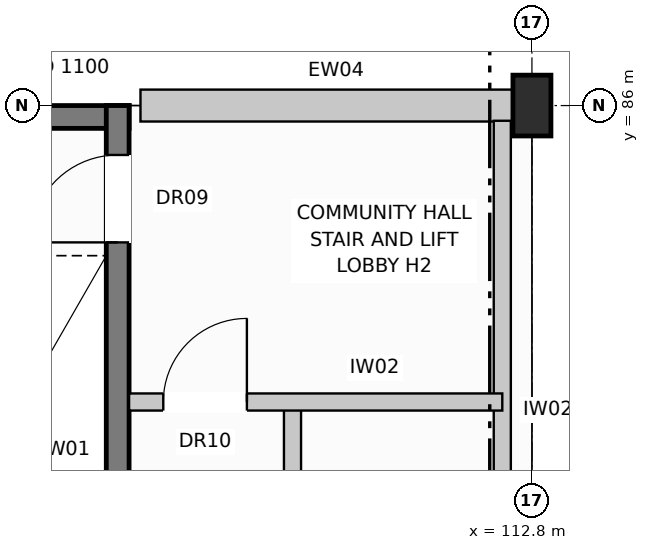
"""IFC4 building model, lengths in metres.
Left out: names, types, materials, properties, quantities, classifications, styles, units other than length and angle.
Written with IfcOpenShell. Run it as: python <this file> out.ifc"""

import sys

from ifc_helpers import new_model, si_unit, direction, frame, frame_2d, origin, origin_with_axes, origin_2d, place, context, subcontext, project, spatial, rectangle, extrude, element, fill, save


model = new_model("IFC4")
c1 = context("Model", 3, precision=1e-05, world=origin(), true_north=direction((0.0, 1.0)))
c2 = subcontext(c1, "Body", "Model", "MODEL_VIEW")
j1 = project(units=[si_unit("LENGTHUNIT", "METRE"), si_unit("PLANEANGLEUNIT", "RADIAN")], contexts=[c1])
p1 = place(None, origin())
s1 = spatial("IfcSite", under=j1, at=p1, CompositionType="ELEMENT")
p2 = place(p1, origin())
s2 = spatial("IfcBuilding", under=s1, at=p2, CompositionType="ELEMENT")
p3 = place(p2, frame((0.0, 0.0, 4.4)))
s3 = spatial("IfcBuildingStorey", under=s2, at=p3, CompositionType="ELEMENT", Elevation=4.4)
p4 = place(p3, frame((112.8, 86.0, 0.0), z_axis=(0.0, 0.0, 1.0), x_axis=(1.0, 0.0, 0.0)))
e1 = element("IfcColumn", 1, at=p4, inside=s3, PredefinedType="COLUMN", context=c2, shape_type="SweptSolid", body=[
    extrude(rectangle(XDim=0.5, YDim=0.8, at=origin_2d()), origin(), (0.0, 0.0, 1.0), 3.6),
])
p5 = place(p3, frame((107.65, 86.0, 0.0), z_axis=(0.0, 0.0, 1.0), x_axis=(1.0, 0.0, 0.0)))
e2 = element("IfcWall", 2, at=p5, inside=s3, PredefinedType="STANDARD", context=c2, shape_type="SweptSolid", body=[
    extrude(rectangle(XDim=5.15, YDim=0.42, at=frame_2d((2.575, 0.0))), origin(), (0.0, 0.0, 1.0), 2.545),
])
p6 = place(p3, frame((103.9, 85.85, 0.0), z_axis=(0.0, 0.0, 1.0), x_axis=(1.0, 0.0, 0.0)))
e3 = element("IfcWall", 3, at=p6, inside=s3, PredefinedType="SHEAR", context=c2, shape_type="SweptSolid", body=[
    extrude(rectangle(XDim=3.6, YDim=0.3, at=frame_2d((1.8, 0.0))), origin(), (0.0, 0.0, 1.0), 3.33),
])
p7 = place(p3, frame((107.35, 78.5, 0.0), z_axis=(0.0, 0.0, 1.0), x_axis=(0.0, 1.0, 0.0)))
e4 = element("IfcWall", 4, at=p7, inside=s3, PredefinedType="SHEAR", context=c2, shape_type="SweptSolid", body=[
    extrude(rectangle(XDim=7.5, YDim=0.3, at=frame_2d((3.75, 0.0))), origin(), (0.0, 0.0, 1.0), 3.33),
])
p8 = place(p7, frame((5.7, 0.0, 0.0)))
e5 = element("IfcOpeningElement", 5, at=p8, cuts=e4, PredefinedType="OPENING", context=c2, shape_type="SweptSolid", body=[
    extrude(rectangle(XDim=1.15, YDim=2.15, at=frame_2d((0.575, 1.075))), frame((0.0, 0.162, 0.0), z_axis=(0.0, -1.0, 0.0), x_axis=(1.0, 0.0, 0.0)), (0.0, 0.0, 1.0), 0.324),
])
p9 = place(p3, frame((112.41, 78.2, 0.0), z_axis=(0.0, 0.0, 1.0), x_axis=(0.0, 1.0, 0.0)))
e6 = element("IfcWall", 6, at=p9, inside=s3, PredefinedType="PARTITIONING", context=c2, shape_type="SweptSolid", body=[
    extrude(rectangle(XDim=7.6, YDim=0.225, at=frame_2d((3.8, 0.0))), origin(), (0.0, 0.0, 1.0), 2.395),
])
p10 = place(p3, frame((109.65, 78.2, 0.0), z_axis=(0.0, 0.0, 1.0), x_axis=(0.0, 1.0, 0.0)))
e7 = element("IfcWall", 7, at=p10, inside=s3, PredefinedType="PARTITIONING", context=c2, shape_type="SweptSolid", body=[
    extrude(rectangle(XDim=3.8, YDim=0.225, at=frame_2d((1.9, 0.0))), origin(), (0.0, 0.0, 1.0), 3.33),
])
p11 = place(p3, frame((107.5, 82.1, 0.0), z_axis=(0.0, 0.0, 1.0), x_axis=(1.0, 0.0, 0.0)))
e8 = element("IfcWall", 8, at=p11, inside=s3, PredefinedType="PARTITIONING", context=c2, shape_type="SweptSolid", body=[
    extrude(rectangle(XDim=4.91, YDim=0.225, at=frame_2d((2.455, 0.0))), origin(), (0.0, 0.0, 1.0), 3.33),
])
p12 = place(p11, frame((0.45, 0.0, 0.0)))
e9 = element("IfcOpeningElement", 9, at=p12, cuts=e8, PredefinedType="OPENING", context=c2, shape_type="SweptSolid", body=[
    extrude(rectangle(XDim=1.1, YDim=2.15, at=frame_2d((0.55, 1.075))), frame((0.0, 0.125, 0.0), z_axis=(0.0, -1.0, 0.0), x_axis=(1.0, 0.0, 0.0)), (0.0, 0.0, 1.0), 0.249),
])
p13 = place(p8, origin_with_axes())
e10 = element("IfcDoor", 10, at=p13, inside=s3, OperationType="SINGLE_SWING_LEFT", PredefinedType="DOOR", context=c2, shape_type="SweptSolid", body=[
    extrude(rectangle(XDim=1.15, YDim=2.15, at=frame_2d((0.575, 1.075))), frame((0.0, 0.025, 0.0), z_axis=(0.0, -1.0, 0.0), x_axis=(1.0, 0.0, 0.0)), (0.0, 0.0, 1.0), 0.05),
])
fill(e5, e10)
p14 = place(p12, origin_with_axes())
e11 = element("IfcDoor", 11, at=p14, inside=s3, OperationType="SINGLE_SWING_RIGHT", PredefinedType="DOOR", context=c2, shape_type="SweptSolid", body=[
    extrude(rectangle(XDim=1.1, YDim=2.15, at=frame_2d((0.55, 1.075))), frame((0.0, 0.025, 0.0), z_axis=(0.0, -1.0, 0.0), x_axis=(1.0, 0.0, 0.0)), (0.0, 0.0, 1.0), 0.05),
])
fill(e9, e11)
save(model, sys.argv[1])
